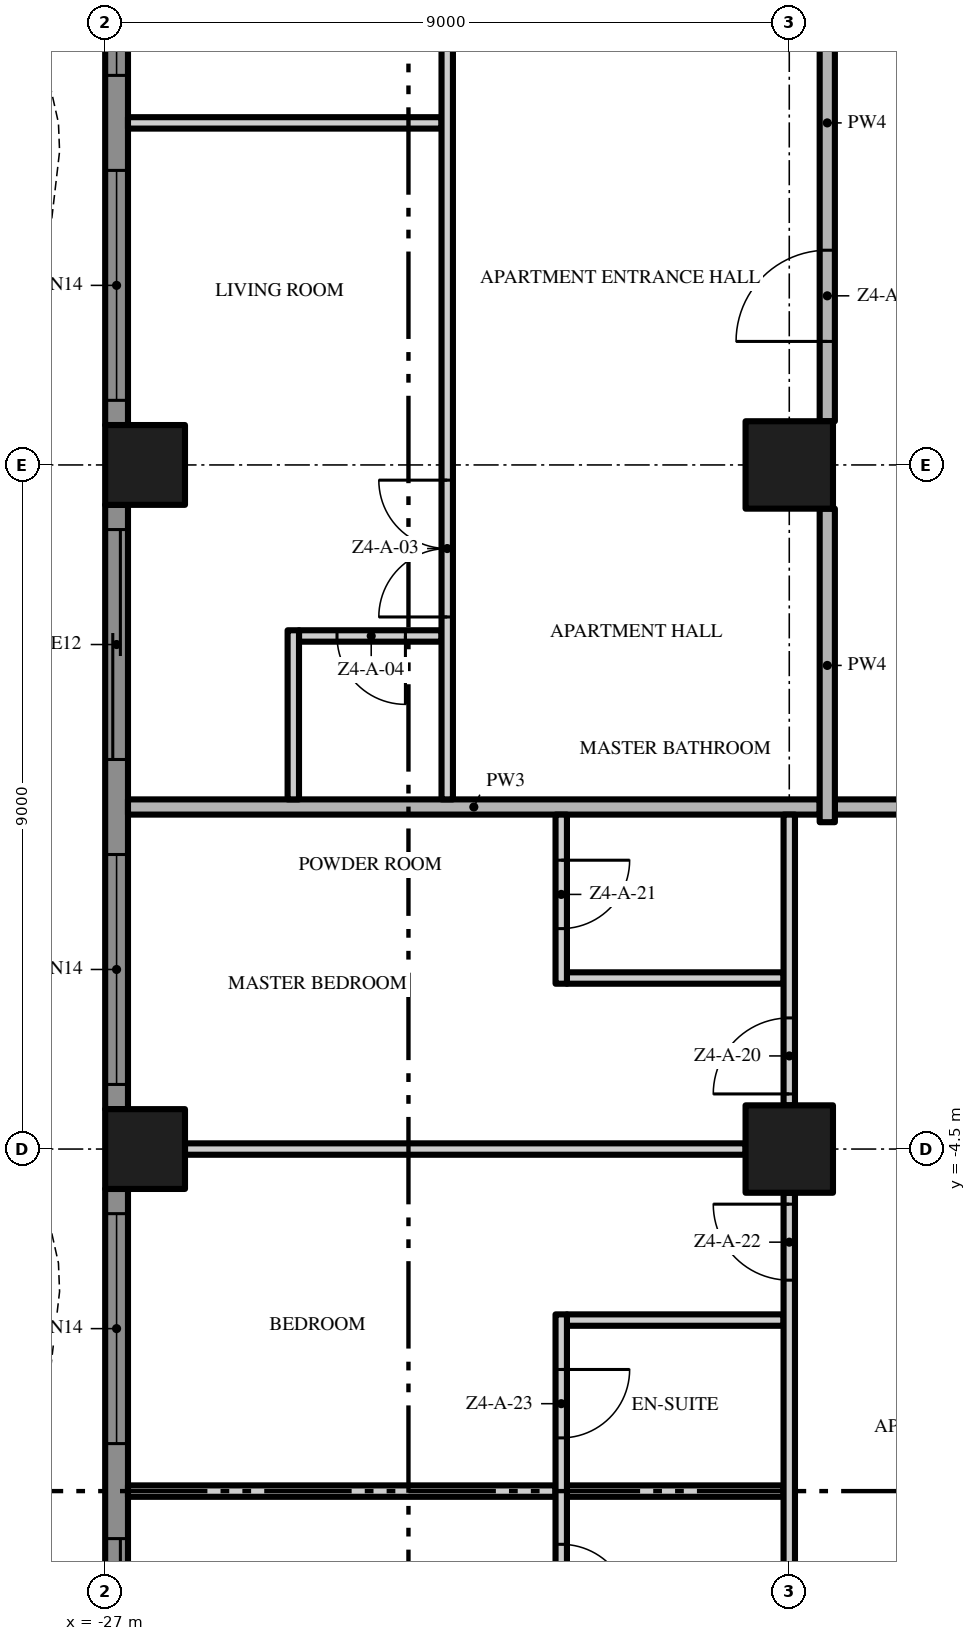
"""IFC4 building model, lengths in metres.
Left out: names, types, materials, properties, quantities, classifications, styles, units other than length and angle.
Written with IfcOpenShell. Run it as: python <this file> out.ifc"""

import sys

from ifc_helpers import new_model, si_unit, direction, frame, frame_2d, origin, origin_2d, place, context, subcontext, project, spatial, polyline, rectangle, outline, extrude, element, fill, save


model = new_model("IFC4")
c1 = context("Model", 3, precision=1e-05, world=origin(), true_north=direction((0.0, 1.0)))
c2 = subcontext(c1, "Body", "Model", "MODEL_VIEW")
j1 = project(units=[si_unit("LENGTHUNIT", "METRE"), si_unit("PLANEANGLEUNIT", "RADIAN")], contexts=[c1])
p1 = place(None, origin())
s1 = spatial("IfcSite", under=j1, at=p1, CompositionType="ELEMENT")
p2 = place(p1, origin())
s2 = spatial("IfcBuilding", under=s1, at=p2, CompositionType="ELEMENT")
p3 = place(p2, frame((0.0, 0.0, 184.4)))
s3 = spatial("IfcBuildingStorey", under=s2, at=p3, CompositionType="ELEMENT", Elevation=184.4)
for number, where, z_axis, x_axis in (
    (1, (-18.0, -4.5, 0.0), (0.0, 0.0, 1.0), (1.0, 0.0, 0.0)),
    (2, (-18.0, 4.5, 0.0), (0.0, 0.0, 1.0), (1.0, 0.0, 0.0)),
):
    element("IfcColumn", number, at=place(p3, frame(where, z_axis=z_axis, x_axis=x_axis)), inside=s3, PredefinedType="COLUMN", context=c2, shape_type="SweptSolid", body=[
        extrude(rectangle(XDim=1.15, YDim=1.15, at=origin_2d()), origin(), (0.0, 0.0, 1.0), 3.5),
    ])
for number, where, z_axis, x_axis in (
    (3, (-26.475, -4.5, 0.0), (0.0, 0.0, 1.0), (1.0, 0.0, 0.0)),
    (4, (-26.475, 4.5, 0.0), (0.0, 0.0, 1.0), (1.0, 0.0, 0.0)),
):
    element("IfcColumn", number, at=place(p3, frame(where, z_axis=z_axis, x_axis=x_axis)), inside=s3, PredefinedType="COLUMN", context=c2, shape_type="SweptSolid", body=[
        extrude(rectangle(XDim=1.05, YDim=1.05, at=origin_2d()), origin(), (0.0, 0.0, 1.0), 3.5),
    ])
p4 = place(p3, frame((-26.85, 5.025, 0.0), z_axis=(0.0, 0.0, 1.0), x_axis=(0.0, 1.0, 0.0)))
e5 = element("IfcWall", 5, at=p4, inside=s3, PredefinedType="SOLIDWALL", context=c2, shape_type="SweptSolid", body=[
    extrude(rectangle(XDim=7.95, YDim=0.3, at=frame_2d((3.975, 0.0))), origin(), (0.0, 0.0, 1.0), 3.5),
])
p5 = place(p4, frame((4.6, 0.0, 0.45)))
e6 = element("IfcOpeningElement", 6, at=p5, cuts=e5, PredefinedType="OPENING", context=c2, shape_type="SweptSolid", body=[
    extrude(rectangle(XDim=3.025, YDim=2.65, at=frame_2d((1.512, 1.325))), frame((0.0, 0.16, 0.0), z_axis=(0.0, -1.0, 0.0), x_axis=(1.0, 0.0, 0.0)), (0.0, 0.0, 1.0), 0.32),
])
p6 = place(p4, frame((0.325, 0.0, 0.45)))
e7 = element("IfcOpeningElement", 7, at=p6, cuts=e5, PredefinedType="OPENING", context=c2, shape_type="SweptSolid", body=[
    extrude(rectangle(XDim=3.025, YDim=2.65, at=frame_2d((1.512, 1.325))), frame((0.0, 0.16, 0.0), z_axis=(0.0, -1.0, 0.0), x_axis=(1.0, 0.0, 0.0)), (0.0, 0.0, 1.0), 0.32),
])
p7 = place(p3, frame((-26.85, -3.975, 0.0), z_axis=(0.0, 0.0, 1.0), x_axis=(0.0, 1.0, 0.0)))
e8 = element("IfcWall", 8, at=p7, inside=s3, PredefinedType="SOLIDWALL", context=c2, shape_type="SweptSolid", body=[
    extrude(rectangle(XDim=7.95, YDim=0.3, at=frame_2d((3.975, 0.0))), origin(), (0.0, 0.0, 1.0), 3.5),
])
p8 = place(p7, frame((4.6, 0.0, 0.0)))
e9 = element("IfcOpeningElement", 9, at=p8, cuts=e8, PredefinedType="OPENING", context=c2, shape_type="SweptSolid", body=[
    extrude(rectangle(XDim=3.025, YDim=2.4, at=frame_2d((1.512, 1.2))), frame((0.0, 0.16, 0.0), z_axis=(0.0, -1.0, 0.0), x_axis=(1.0, 0.0, 0.0)), (0.0, 0.0, 1.0), 0.32),
])
p9 = place(p7, frame((0.325, 0.0, 0.45)))
e10 = element("IfcOpeningElement", 10, at=p9, cuts=e8, PredefinedType="OPENING", context=c2, shape_type="SweptSolid", body=[
    extrude(rectangle(XDim=3.025, YDim=2.65, at=frame_2d((1.512, 1.325))), frame((0.0, 0.16, 0.0), z_axis=(0.0, -1.0, 0.0), x_axis=(1.0, 0.0, 0.0)), (0.0, 0.0, 1.0), 0.32),
])
p10 = place(p3, frame((-26.85, -12.975, 0.0), z_axis=(0.0, 0.0, 1.0), x_axis=(0.0, 1.0, 0.0)))
e11 = element("IfcWall", 11, at=p10, inside=s3, PredefinedType="SOLIDWALL", context=c2, shape_type="SweptSolid", body=[
    extrude(rectangle(XDim=7.95, YDim=0.3, at=frame_2d((3.975, 0.0))), origin(), (0.0, 0.0, 1.0), 3.5),
])
p11 = place(p10, frame((4.6, 0.0, 0.45)))
e12 = element("IfcOpeningElement", 12, at=p11, cuts=e11, PredefinedType="OPENING", context=c2, shape_type="SweptSolid", body=[
    extrude(rectangle(XDim=3.025, YDim=2.65, at=frame_2d((1.512, 1.325))), frame((0.0, 0.16, 0.0), z_axis=(0.0, -1.0, 0.0), x_axis=(1.0, 0.0, 0.0)), (0.0, 0.0, 1.0), 0.32),
])
p12 = place(p10, frame((0.325, 0.0, 0.0)))
e13 = element("IfcOpeningElement", 13, at=p12, cuts=e11, PredefinedType="OPENING", context=c2, shape_type="SweptSolid", body=[
    extrude(rectangle(XDim=3.025, YDim=2.4, at=frame_2d((1.512, 1.2))), frame((0.0, 0.16, 0.0), z_axis=(0.0, -1.0, 0.0), x_axis=(1.0, 0.0, 0.0)), (0.0, 0.0, 1.0), 0.32),
])
p13 = place(p3, origin())
e14 = element("IfcWall", 14, at=p13, inside=s3, PredefinedType="USERDEFINED", context=c2, shape_type="SweptSolid", body=[
    extrude(outline(polyline([(-29.649, 18.0), (-29.985, 16.5), (-30.0, 16.125), (-29.869, 15.0), (-29.345, 13.5), (-28.612, 12.0), (-27.951, 10.5), (-27.615, 9.0), (-27.6, 8.625), (-27.731, 7.5), (-28.255, 6.0), (-28.988, 4.5), (-29.649, 3.0), (-29.985, 1.5), (-30.0, 1.125), (-29.869, 0.0), (-29.345, -1.5), (-28.612, -3.0), (-27.951, -4.5), (-27.615, -6.0), (-27.6, -6.375), (-27.731, -7.5), (-28.255, -9.0), (-28.988, -10.5), (-29.649, -12.0), (-29.985, -13.5), (-30.0, -13.875), (-29.869, -15.0), (-29.345, -16.5), (-28.612, -18.0), (-28.388, -17.89), (-29.114, -16.404), (-29.624, -14.944), (-29.749, -13.865), (-29.736, -13.533), (-29.41, -12.079), (-28.761, -10.605), (-28.024, -9.096), (-27.486, -7.556), (-27.349, -6.385), (-27.366, -5.967), (-27.713, -4.421), (-28.385, -2.895), (-29.114, -1.404), (-29.624, 0.056), (-29.749, 1.135), (-29.736, 1.467), (-29.41, 2.921), (-28.761, 4.395), (-28.024, 5.904), (-27.486, 7.444), (-27.349, 8.615), (-27.366, 9.033), (-27.713, 10.579), (-28.385, 12.105), (-29.114, 13.596), (-29.624, 15.056), (-29.749, 16.135), (-29.736, 16.467), (-29.405, 17.945), (-29.649, 18.0)])), origin(), (0.0, 0.0, 1.0), 0.9),
])
p14 = place(p3, frame((-26.7, -9.0, 0.0), z_axis=(0.0, 0.0, 1.0), x_axis=(1.0, 0.0, 0.0)))
e15 = element("IfcWall", 15, at=p14, inside=s3, PredefinedType="PARTITIONING", context=c2, shape_type="SweptSolid", body=[
    extrude(rectangle(XDim=5.625, YDim=0.15, at=frame_2d((2.812, 0.0))), origin(), (0.0, 0.0, 1.0), 3.5),
])
for number, where, z_axis, x_axis in (
    (16, (-20.925, -9.0, 0.0), (0.0, 0.0, 1.0), (1.0, 0.0, 0.0)),
    (17, (-20.925, -6.75, 0.0), (0.0, 0.0, 1.0), (1.0, 0.0, 0.0)),
):
    element("IfcWall", number, at=place(p3, frame(where, z_axis=z_axis, x_axis=x_axis)), inside=s3, PredefinedType="PARTITIONING", context=c2, shape_type="SweptSolid", body=[
        extrude(rectangle(XDim=2.85, YDim=0.15, at=frame_2d((1.425, 0.0))), origin(), (0.0, 0.0, 1.0), 3.5),
    ])
p15 = place(p3, frame((-25.95, -4.5, 0.0), z_axis=(0.0, 0.0, 1.0), x_axis=(1.0, 0.0, 0.0)))
e18 = element("IfcWall", 18, at=p15, inside=s3, PredefinedType="PARTITIONING", context=c2, shape_type="SweptSolid", body=[
    extrude(rectangle(XDim=7.375, YDim=0.15, at=frame_2d((3.688, 0.0))), origin(), (0.0, 0.0, 1.0), 3.5),
])
p16 = place(p3, frame((-20.925, -2.25, 0.0), z_axis=(0.0, 0.0, 1.0), x_axis=(1.0, 0.0, 0.0)))
e19 = element("IfcWall", 19, at=p16, inside=s3, PredefinedType="PARTITIONING", context=c2, shape_type="SweptSolid", body=[
    extrude(rectangle(XDim=2.85, YDim=0.15, at=frame_2d((1.425, 0.0))), origin(), (0.0, 0.0, 1.0), 3.5),
])
p17 = place(p3, frame((-17.4, 0.0, 0.0), z_axis=(0.0, 0.0, 1.0), x_axis=(1.0, 0.0, 0.0)))
e20 = element("IfcWall", 20, at=p17, inside=s3, PredefinedType="PARTITIONING", context=c2, shape_type="SweptSolid", body=[
    extrude(rectangle(XDim=12.8, YDim=0.2, at=frame_2d((6.4, 0.0))), origin(), (0.0, 0.0, 1.0), 3.5),
])
p18 = place(p3, frame((-26.7, 0.0, 0.0), z_axis=(0.0, 0.0, 1.0), x_axis=(1.0, 0.0, 0.0)))
e21 = element("IfcWall", 21, at=p18, inside=s3, PredefinedType="PARTITIONING", context=c2, shape_type="SweptSolid", body=[
    extrude(rectangle(XDim=9.1, YDim=0.2, at=frame_2d((4.55, 0.0))), origin(), (0.0, 0.0, 1.0), 3.5),
])
p19 = place(p3, frame((-22.575, 2.25, 0.0), z_axis=(0.0, 0.0, 1.0), x_axis=(-1.0, 0.0, 0.0)))
e22 = element("IfcWall", 22, at=p19, inside=s3, PredefinedType="PARTITIONING", context=c2, shape_type="SweptSolid", body=[
    extrude(rectangle(XDim=1.875, YDim=0.15, at=frame_2d((0.938, 0.0))), origin(), (0.0, 0.0, 1.0), 3.5),
])
p20 = place(p19, frame((0.475, 0.0, 0.0)))
e23 = element("IfcOpeningElement", 23, at=p20, cuts=e22, PredefinedType="OPENING", context=c2, shape_type="SweptSolid", body=[
    extrude(rectangle(XDim=0.9, YDim=2.1, at=frame_2d((0.45, 1.05))), frame((0.0, 0.085, 0.0), z_axis=(0.0, -1.0, 0.0), x_axis=(1.0, 0.0, 0.0)), (0.0, 0.0, 1.0), 0.17),
])
p21 = place(p3, frame((-26.7, 9.0, 0.0), z_axis=(0.0, 0.0, 1.0), x_axis=(1.0, 0.0, 0.0)))
e24 = element("IfcWall", 24, at=p21, inside=s3, PredefinedType="PARTITIONING", context=c2, shape_type="SweptSolid", body=[
    extrude(rectangle(XDim=4.125, YDim=0.15, at=frame_2d((2.062, 0.0))), origin(), (0.0, 0.0, 1.0), 3.5),
])
p22 = place(p3, frame((-24.525, 0.1, 0.0), z_axis=(0.0, 0.0, 1.0), x_axis=(0.0, 1.0, 0.0)))
e25 = element("IfcWall", 25, at=p22, inside=s3, PredefinedType="PARTITIONING", context=c2, shape_type="SweptSolid", body=[
    extrude(rectangle(XDim=2.225, YDim=0.15, at=frame_2d((1.113, 0.0))), origin(), (0.0, 0.0, 1.0), 3.5),
])
p23 = place(p3, frame((-22.5, 0.1, 0.0), z_axis=(0.0, 0.0, 1.0), x_axis=(0.0, 1.0, 0.0)))
e26 = element("IfcWall", 26, at=p23, inside=s3, PredefinedType="PARTITIONING", context=c2, shape_type="SweptSolid", body=[
    extrude(rectangle(XDim=17.375, YDim=0.15, at=frame_2d((8.688, 0.0))), origin(), (0.0, 0.0, 1.0), 3.5),
])
p24 = place(p23, frame((2.4, 0.0, 0.0)))
e27 = element("IfcOpeningElement", 27, at=p24, cuts=e26, PredefinedType="OPENING", context=c2, shape_type="SweptSolid", body=[
    extrude(rectangle(XDim=1.8, YDim=2.4, at=frame_2d((0.9, 1.2))), frame((0.0, 0.085, 0.0), z_axis=(0.0, -1.0, 0.0), x_axis=(1.0, 0.0, 0.0)), (0.0, 0.0, 1.0), 0.17),
])
p25 = place(p23, frame((10.65, 0.0, 0.0)))
e28 = element("IfcOpeningElement", 28, at=p25, cuts=e26, PredefinedType="OPENING", context=c2, shape_type="SweptSolid", body=[
    extrude(rectangle(XDim=1.0, YDim=2.4, at=frame_2d((0.5, 1.2))), frame((0.0, 0.085, 0.0), z_axis=(0.0, -1.0, 0.0), x_axis=(1.0, 0.0, 0.0)), (0.0, 0.0, 1.0), 0.17),
])
p26 = place(p3, frame((-21.0, -6.675, 0.0), z_axis=(0.0, 0.0, 1.0), x_axis=(0.0, -1.0, 0.0)))
e29 = element("IfcWall", 29, at=p26, inside=s3, PredefinedType="PARTITIONING", context=c2, shape_type="SweptSolid", body=[
    extrude(rectangle(XDim=4.65, YDim=0.15, at=frame_2d((2.325, 0.0))), origin(), (0.0, 0.0, 1.0), 3.5),
])
p27 = place(p26, frame((0.725, 0.0, 0.0)))
e30 = element("IfcOpeningElement", 30, at=p27, cuts=e29, PredefinedType="OPENING", context=c2, shape_type="SweptSolid", body=[
    extrude(rectangle(XDim=0.9, YDim=2.1, at=frame_2d((0.45, 1.05))), frame((0.0, 0.085, 0.0), z_axis=(0.0, -1.0, 0.0), x_axis=(1.0, 0.0, 0.0)), (0.0, 0.0, 1.0), 0.17),
])
p28 = place(p26, frame((3.025, 0.0, 0.0)))
e31 = element("IfcOpeningElement", 31, at=p28, cuts=e29, PredefinedType="OPENING", context=c2, shape_type="SweptSolid", body=[
    extrude(rectangle(XDim=0.9, YDim=2.1, at=frame_2d((0.45, 1.05))), frame((0.0, 0.085, 0.0), z_axis=(0.0, -1.0, 0.0), x_axis=(1.0, 0.0, 0.0)), (0.0, 0.0, 1.0), 0.17),
])
p29 = place(p3, frame((-21.0, -0.1, 0.0), z_axis=(0.0, 0.0, 1.0), x_axis=(0.0, -1.0, 0.0)))
e32 = element("IfcWall", 32, at=p29, inside=s3, PredefinedType="PARTITIONING", context=c2, shape_type="SweptSolid", body=[
    extrude(rectangle(XDim=2.225, YDim=0.15, at=frame_2d((1.113, 0.0))), origin(), (0.0, 0.0, 1.0), 3.5),
])
p30 = place(p29, frame((0.6, 0.0, 0.0)))
e33 = element("IfcOpeningElement", 33, at=p30, cuts=e32, PredefinedType="OPENING", context=c2, shape_type="SweptSolid", body=[
    extrude(rectangle(XDim=0.9, YDim=2.1, at=frame_2d((0.45, 1.05))), frame((0.0, 0.085, 0.0), z_axis=(0.0, -1.0, 0.0), x_axis=(1.0, 0.0, 0.0)), (0.0, 0.0, 1.0), 0.17),
])
p31 = place(p3, frame((-18.0, -12.925, 0.0), z_axis=(0.0, 0.0, 1.0), x_axis=(0.0, 1.0, 0.0)))
e34 = element("IfcWall", 34, at=p31, inside=s3, PredefinedType="PARTITIONING", context=c2, shape_type="SweptSolid", body=[
    extrude(rectangle(XDim=7.85, YDim=0.15, at=frame_2d((3.925, 0.0))), origin(), (0.0, 0.0, 1.0), 3.5),
])
p32 = place(p31, frame((6.7, 0.0, 0.0)))
e35 = element("IfcOpeningElement", 35, at=p32, cuts=e34, PredefinedType="OPENING", context=c2, shape_type="SweptSolid", body=[
    extrude(rectangle(XDim=1.0, YDim=2.4, at=frame_2d((0.5, 1.2))), frame((0.0, 0.085, 0.0), z_axis=(0.0, -1.0, 0.0), x_axis=(1.0, 0.0, 0.0)), (0.0, 0.0, 1.0), 0.17),
])
p33 = place(p31, frame((0.15, 0.0, 0.0)))
e36 = element("IfcOpeningElement", 36, at=p33, cuts=e34, PredefinedType="OPENING", context=c2, shape_type="SweptSolid", body=[
    extrude(rectangle(XDim=1.0, YDim=2.4, at=frame_2d((0.5, 1.2))), frame((0.0, 0.085, 0.0), z_axis=(0.0, -1.0, 0.0), x_axis=(1.0, 0.0, 0.0)), (0.0, 0.0, 1.0), 0.17),
])
p34 = place(p3, frame((-18.0, -3.925, 0.0), z_axis=(0.0, 0.0, 1.0), x_axis=(0.0, 1.0, 0.0)))
e37 = element("IfcWall", 37, at=p34, inside=s3, PredefinedType="PARTITIONING", context=c2, shape_type="SweptSolid", body=[
    extrude(rectangle(XDim=3.825, YDim=0.15, at=frame_2d((1.913, 0.0))), origin(), (0.0, 0.0, 1.0), 3.5),
])
p35 = place(p34, frame((0.15, 0.0, 0.0)))
e38 = element("IfcOpeningElement", 38, at=p35, cuts=e37, PredefinedType="OPENING", context=c2, shape_type="SweptSolid", body=[
    extrude(rectangle(XDim=1.0, YDim=2.4, at=frame_2d((0.5, 1.2))), frame((0.0, 0.085, 0.0), z_axis=(0.0, -1.0, 0.0), x_axis=(1.0, 0.0, 0.0)), (0.0, 0.0, 1.0), 0.17),
])
p36 = place(p3, frame((-17.5, -0.2, 0.0), z_axis=(0.0, 0.0, 1.0), x_axis=(0.0, 1.0, 0.0)))
e39 = element("IfcWall", 39, at=p36, inside=s3, PredefinedType="PARTITIONING", context=c2, shape_type="SweptSolid", body=[
    extrude(rectangle(XDim=4.125, YDim=0.2, at=frame_2d((2.062, 0.0))), origin(), (0.0, 0.0, 1.0), 3.5),
])
p37 = place(p3, frame((-17.5, 5.075, 0.0), z_axis=(0.0, 0.0, 1.0), x_axis=(0.0, 1.0, 0.0)))
e40 = element("IfcWall", 40, at=p37, inside=s3, PredefinedType="PARTITIONING", context=c2, shape_type="SweptSolid", body=[
    extrude(rectangle(XDim=7.85, YDim=0.2, at=frame_2d((3.925, 0.0))), origin(), (0.0, 0.0, 1.0), 3.5),
])
p38 = place(p37, frame((1.05, 0.0, 0.0)))
e41 = element("IfcOpeningElement", 41, at=p38, cuts=e40, PredefinedType="OPENING", context=c2, shape_type="SweptSolid", body=[
    extrude(rectangle(XDim=1.2, YDim=2.4, at=frame_2d((0.6, 1.2))), frame((0.0, 0.11, 0.0), z_axis=(0.0, -1.0, 0.0), x_axis=(1.0, 0.0, 0.0)), (0.0, 0.0, 1.0), 0.22),
])
p39 = place(p5, origin())
e42 = element("IfcWindow", 42, at=p39, inside=s3, PartitioningType="SINGLE_PANEL", PredefinedType="WINDOW", context=c2, shape_type="SweptSolid", body=[
    extrude(rectangle(XDim=3.025, YDim=2.65, at=frame_2d((1.512, 1.325))), frame((0.0, 0.03, 0.0), z_axis=(0.0, -1.0, 0.0), x_axis=(1.0, 0.0, 0.0)), (0.0, 0.0, 1.0), 0.06),
])
fill(e6, e42)
p40 = place(p6, origin())
e43 = element("IfcWindow", 43, at=p40, inside=s3, PartitioningType="SINGLE_PANEL", PredefinedType="WINDOW", context=c2, shape_type="SweptSolid", body=[
    extrude(rectangle(XDim=3.025, YDim=2.65, at=frame_2d((1.512, 1.325))), frame((0.0, 0.03, 0.0), z_axis=(0.0, -1.0, 0.0), x_axis=(1.0, 0.0, 0.0)), (0.0, 0.0, 1.0), 0.06),
])
fill(e7, e43)
p41 = place(p8, origin())
e44 = element("IfcDoor", 44, at=p41, inside=s3, OperationType="SINGLE_SWING_LEFT", PredefinedType="DOOR", context=c2, shape_type="SweptSolid", body=[
    extrude(rectangle(XDim=3.025, YDim=2.4, at=frame_2d((1.512, 1.2))), frame((0.0, 0.025, 0.0), z_axis=(0.0, -1.0, 0.0), x_axis=(1.0, 0.0, 0.0)), (0.0, 0.0, 1.0), 0.05),
])
fill(e9, e44)
p42 = place(p9, origin())
e45 = element("IfcWindow", 45, at=p42, inside=s3, PartitioningType="SINGLE_PANEL", PredefinedType="WINDOW", context=c2, shape_type="SweptSolid", body=[
    extrude(rectangle(XDim=3.025, YDim=2.65, at=frame_2d((1.512, 1.325))), frame((0.0, 0.03, 0.0), z_axis=(0.0, -1.0, 0.0), x_axis=(1.0, 0.0, 0.0)), (0.0, 0.0, 1.0), 0.06),
])
fill(e10, e45)
p43 = place(p11, origin())
e46 = element("IfcWindow", 46, at=p43, inside=s3, PartitioningType="SINGLE_PANEL", PredefinedType="WINDOW", context=c2, shape_type="SweptSolid", body=[
    extrude(rectangle(XDim=3.025, YDim=2.65, at=frame_2d((1.512, 1.325))), frame((0.0, 0.03, 0.0), z_axis=(0.0, -1.0, 0.0), x_axis=(1.0, 0.0, 0.0)), (0.0, 0.0, 1.0), 0.06),
])
fill(e12, e46)
p44 = place(p12, origin())
e47 = element("IfcDoor", 47, at=p44, inside=s3, OperationType="SINGLE_SWING_LEFT", PredefinedType="DOOR", context=c2, shape_type="SweptSolid", body=[
    extrude(rectangle(XDim=3.025, YDim=2.4, at=frame_2d((1.512, 1.2))), frame((0.0, 0.025, 0.0), z_axis=(0.0, -1.0, 0.0), x_axis=(1.0, 0.0, 0.0)), (0.0, 0.0, 1.0), 0.05),
])
fill(e13, e47)
p45 = place(p38, origin())
e48 = element("IfcDoor", 48, at=p45, inside=s3, OperationType="SINGLE_SWING_LEFT", PredefinedType="DOOR", context=c2, shape_type="SweptSolid", body=[
    extrude(rectangle(XDim=1.2, YDim=2.4, at=frame_2d((0.6, 1.2))), frame((0.0, 0.025, 0.0), z_axis=(0.0, -1.0, 0.0), x_axis=(1.0, 0.0, 0.0)), (0.0, 0.0, 1.0), 0.05),
])
fill(e41, e48)
p46 = place(p24, origin())
e49 = element("IfcDoor", 49, at=p46, inside=s3, OperationType="DOUBLE_DOOR_SINGLE_SWING", PredefinedType="DOOR", context=c2, shape_type="SweptSolid", body=[
    extrude(rectangle(XDim=1.8, YDim=2.4, at=frame_2d((0.9, 1.2))), frame((0.0, 0.025, 0.0), z_axis=(0.0, -1.0, 0.0), x_axis=(1.0, 0.0, 0.0)), (0.0, 0.0, 1.0), 0.05),
])
fill(e27, e49)
p47 = place(p20, origin())
e50 = element("IfcDoor", 50, at=p47, inside=s3, OperationType="SINGLE_SWING_LEFT", PredefinedType="DOOR", context=c2, shape_type="SweptSolid", body=[
    extrude(rectangle(XDim=0.9, YDim=2.1, at=frame_2d((0.45, 1.05))), frame((0.0, 0.025, 0.0), z_axis=(0.0, -1.0, 0.0), x_axis=(1.0, 0.0, 0.0)), (0.0, 0.0, 1.0), 0.05),
])
fill(e23, e50)
p48 = place(p35, origin())
e51 = element("IfcDoor", 51, at=p48, inside=s3, OperationType="SINGLE_SWING_LEFT", PredefinedType="DOOR", context=c2, shape_type="SweptSolid", body=[
    extrude(rectangle(XDim=1.0, YDim=2.4, at=frame_2d((0.5, 1.2))), frame((0.0, 0.025, 0.0), z_axis=(0.0, -1.0, 0.0), x_axis=(1.0, 0.0, 0.0)), (0.0, 0.0, 1.0), 0.05),
])
fill(e38, e51)
p49 = place(p30, origin())
e52 = element("IfcDoor", 52, at=p49, inside=s3, OperationType="SINGLE_SWING_LEFT", PredefinedType="DOOR", context=c2, shape_type="SweptSolid", body=[
    extrude(rectangle(XDim=0.9, YDim=2.1, at=frame_2d((0.45, 1.05))), frame((0.0, 0.025, 0.0), z_axis=(0.0, -1.0, 0.0), x_axis=(1.0, 0.0, 0.0)), (0.0, 0.0, 1.0), 0.05),
])
fill(e33, e52)
p50 = place(p32, origin())
e53 = element("IfcDoor", 53, at=p50, inside=s3, OperationType="SINGLE_SWING_RIGHT", PredefinedType="DOOR", context=c2, shape_type="SweptSolid", body=[
    extrude(rectangle(XDim=1.0, YDim=2.4, at=frame_2d((0.5, 1.2))), frame((0.0, 0.025, 0.0), z_axis=(0.0, -1.0, 0.0), x_axis=(1.0, 0.0, 0.0)), (0.0, 0.0, 1.0), 0.05),
])
fill(e35, e53)
p51 = place(p27, origin())
e54 = element("IfcDoor", 54, at=p51, inside=s3, OperationType="SINGLE_SWING_LEFT", PredefinedType="DOOR", context=c2, shape_type="SweptSolid", body=[
    extrude(rectangle(XDim=0.9, YDim=2.1, at=frame_2d((0.45, 1.05))), frame((0.0, 0.025, 0.0), z_axis=(0.0, -1.0, 0.0), x_axis=(1.0, 0.0, 0.0)), (0.0, 0.0, 1.0), 0.05),
])
fill(e30, e54)
p52 = place(p28, origin())
e55 = element("IfcDoor", 55, at=p52, inside=s3, OperationType="SINGLE_SWING_RIGHT", PredefinedType="DOOR", context=c2, shape_type="SweptSolid", body=[
    extrude(rectangle(XDim=0.9, YDim=2.1, at=frame_2d((0.45, 1.05))), frame((0.0, 0.025, 0.0), z_axis=(0.0, -1.0, 0.0), x_axis=(1.0, 0.0, 0.0)), (0.0, 0.0, 1.0), 0.05),
])
fill(e31, e55)
save(model, sys.argv[1])
